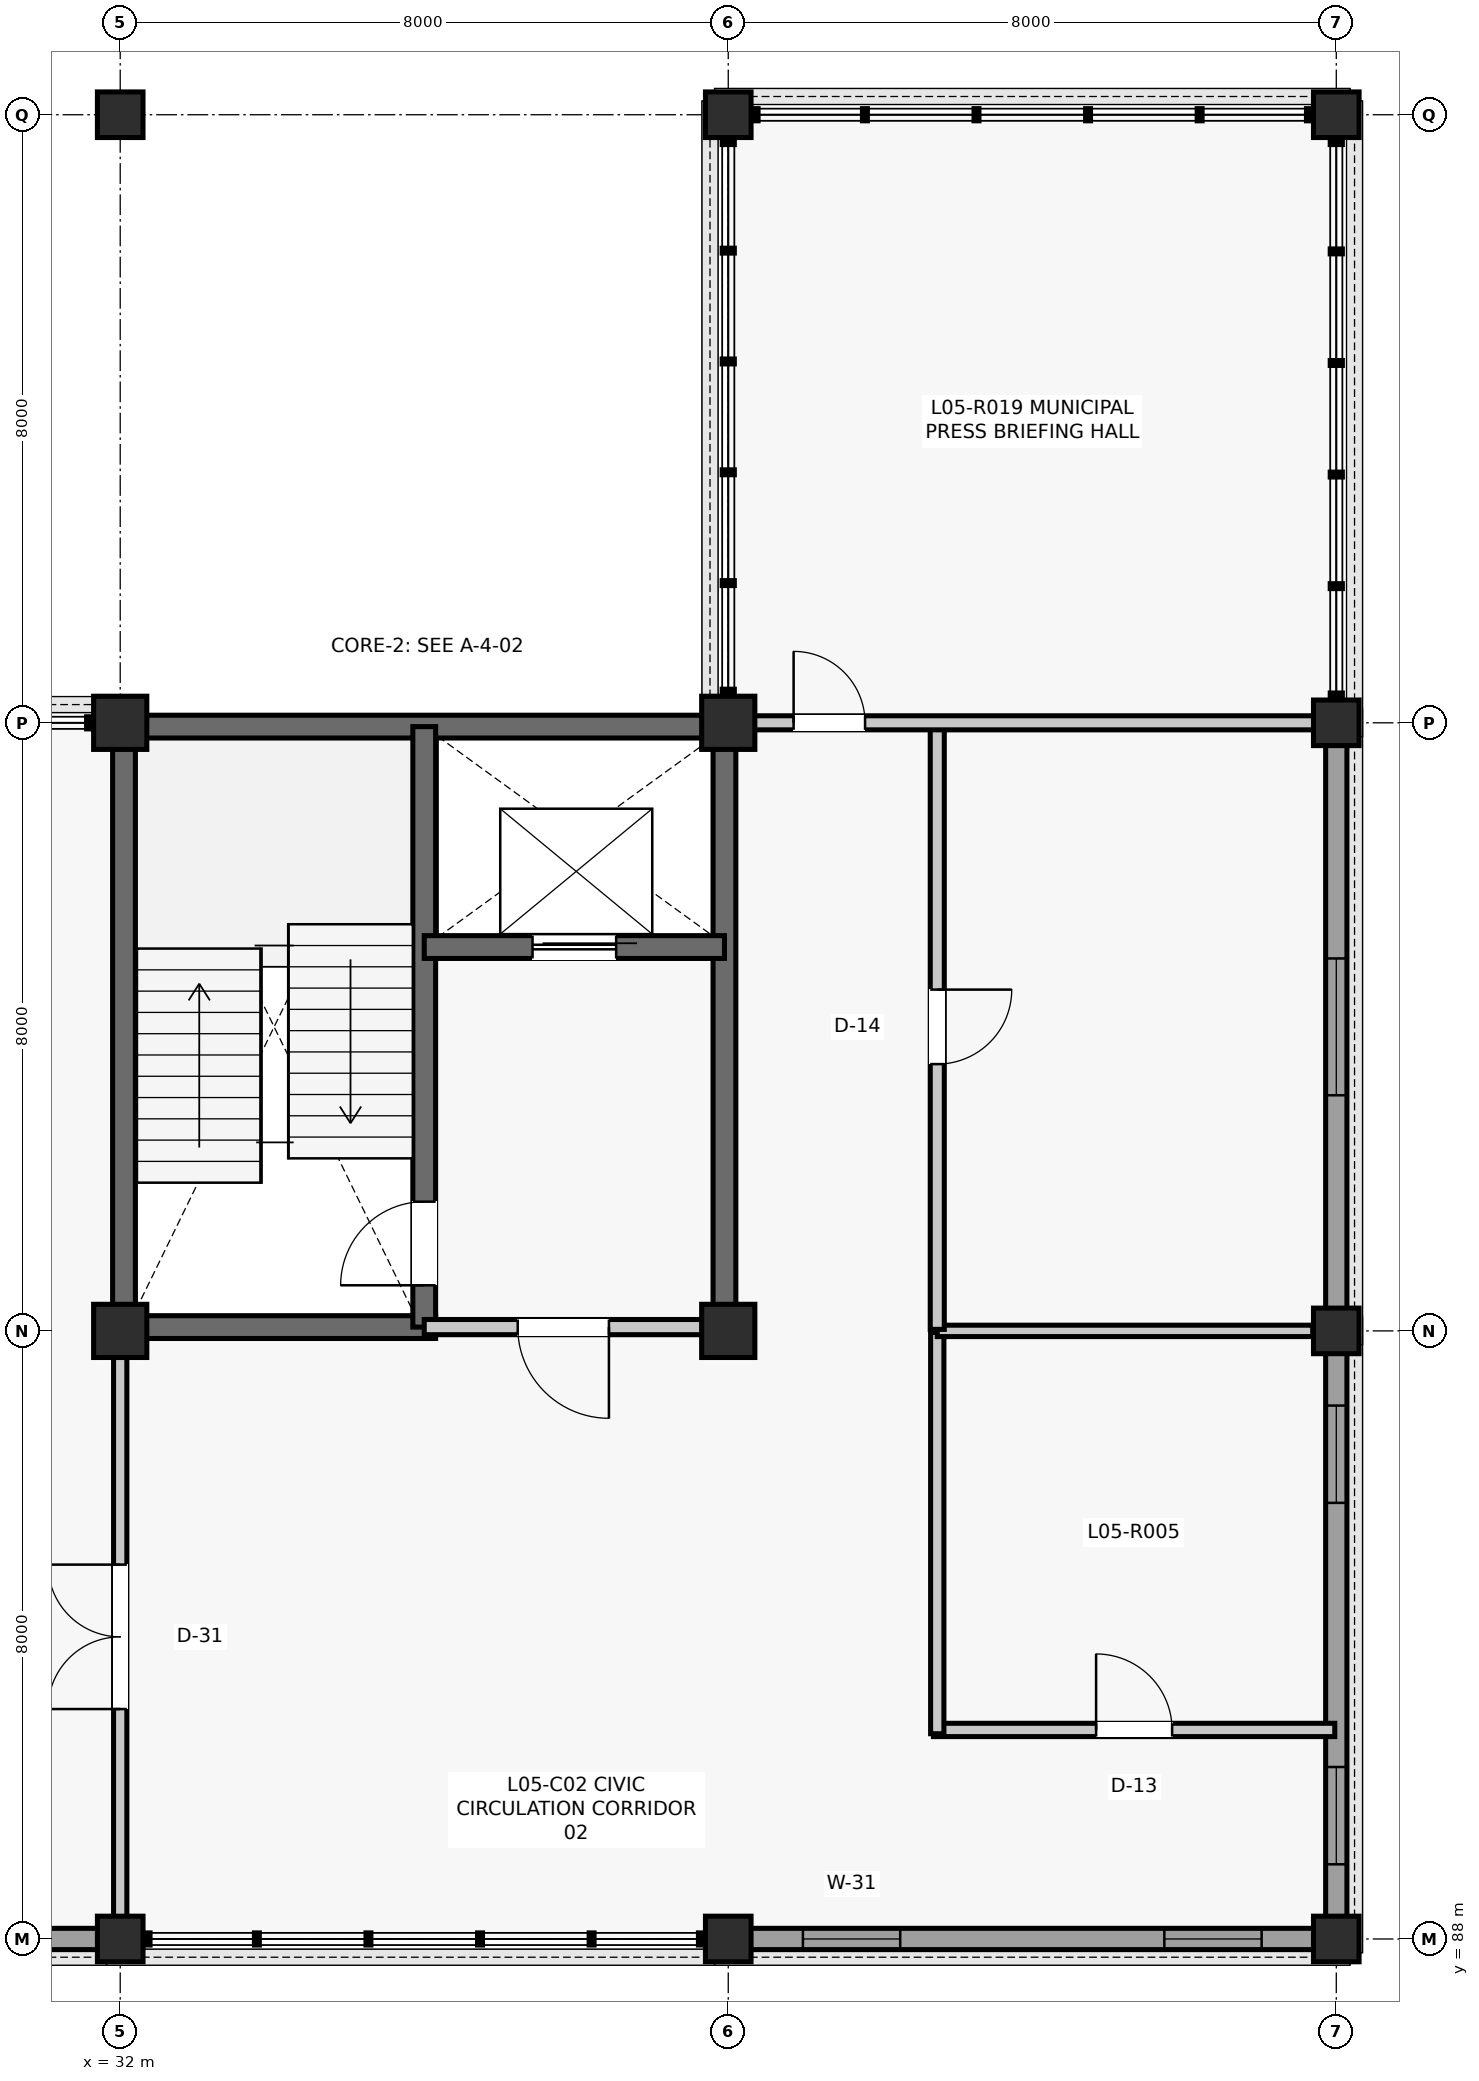
"""IFC4 building model, lengths in metres.
Left out: names, types, materials, properties, quantities, classifications, styles, units other than length and angle.
Written with IfcOpenShell. Run it as: python <this file> out.ifc"""

import sys

from ifc_helpers import new_model, si_unit, direction, frame, frame_2d, origin, origin_2d, place, context, subcontext, project, spatial, rectangle, extrude, element, fill, save


model = new_model("IFC4")
c1 = context("Model", 3, precision=1e-05, world=origin(), true_north=direction((0.0, 1.0)))
c2 = subcontext(c1, "Body", "Model", "MODEL_VIEW")
j1 = project(units=[si_unit("LENGTHUNIT", "METRE"), si_unit("PLANEANGLEUNIT", "RADIAN")], contexts=[c1])
p1 = place(None, origin())
s1 = spatial("IfcSite", under=j1, at=p1, CompositionType="ELEMENT")
p2 = place(p1, origin())
s2 = spatial("IfcBuilding", under=s1, at=p2, CompositionType="ELEMENT")
p3 = place(p2, frame((0.0, 0.0, 21.78)))
s3 = spatial("IfcBuildingStorey", under=s2, at=p3, CompositionType="ELEMENT", Elevation=21.78)
p4 = place(p3, frame((32.0, 88.0, 0.0), z_axis=(0.0, 0.0, 1.0), x_axis=(1.0, 0.0, 0.0)))
e1 = element("IfcColumn", 1, at=p4, inside=s3, PredefinedType="COLUMN", context=c2, shape_type="SweptSolid", body=[
    extrude(rectangle(XDim=0.6, YDim=0.6, at=origin_2d()), origin(), (0.0, 0.0, 1.0), 3.96),
])
for number, where, z_axis, x_axis in (
    (2, (32.0, 96.0, 0.0), (0.0, 0.0, 1.0), (1.0, 0.0, 0.0)),
    (3, (32.0, 104.0, 0.0), (0.0, 0.0, 1.0), (1.0, 0.0, 0.0)),
):
    element("IfcColumn", number, at=place(p3, frame(where, z_axis=z_axis, x_axis=x_axis)), inside=s3, PredefinedType="COLUMN", context=c2, shape_type="SweptSolid", body=[
        extrude(rectangle(XDim=0.7, YDim=0.7, at=origin_2d()), origin(), (0.0, 0.0, 1.0), 3.96),
    ])
for number, where, z_axis, x_axis in (
    (4, (32.0, 112.0, 0.0), (0.0, 0.0, 1.0), (1.0, 0.0, 0.0)),
    (5, (40.0, 88.0, 0.0), (0.0, 0.0, 1.0), (1.0, 0.0, 0.0)),
):
    element("IfcColumn", number, at=place(p3, frame(where, z_axis=z_axis, x_axis=x_axis)), inside=s3, PredefinedType="COLUMN", context=c2, shape_type="SweptSolid", body=[
        extrude(rectangle(XDim=0.6, YDim=0.6, at=origin_2d()), origin(), (0.0, 0.0, 1.0), 3.96),
    ])
for number, where, z_axis, x_axis in (
    (6, (40.0, 96.0, 0.0), (0.0, 0.0, 1.0), (1.0, 0.0, 0.0)),
    (7, (40.0, 104.0, 0.0), (0.0, 0.0, 1.0), (1.0, 0.0, 0.0)),
):
    element("IfcColumn", number, at=place(p3, frame(where, z_axis=z_axis, x_axis=x_axis)), inside=s3, PredefinedType="COLUMN", context=c2, shape_type="SweptSolid", body=[
        extrude(rectangle(XDim=0.7, YDim=0.7, at=origin_2d()), origin(), (0.0, 0.0, 1.0), 3.96),
    ])
for number, where, z_axis, x_axis in (
    (8, (40.0, 112.0, 0.0), (0.0, 0.0, 1.0), (1.0, 0.0, 0.0)),
    (9, (48.0, 88.0, 0.0), (0.0, 0.0, 1.0), (1.0, 0.0, 0.0)),
    (10, (48.0, 96.0, 0.0), (0.0, 0.0, 1.0), (1.0, 0.0, 0.0)),
    (11, (48.0, 104.0, 0.0), (0.0, 0.0, 1.0), (1.0, 0.0, 0.0)),
    (12, (48.0, 112.0, 0.0), (0.0, 0.0, 1.0), (1.0, 0.0, 0.0)),
):
    element("IfcColumn", number, at=place(p3, frame(where, z_axis=z_axis, x_axis=x_axis)), inside=s3, PredefinedType="COLUMN", context=c2, shape_type="SweptSolid", body=[
        extrude(rectangle(XDim=0.6, YDim=0.6, at=origin_2d()), origin(), (0.0, 0.0, 1.0), 3.96),
    ])
p5 = place(p3, frame((24.285, 88.0, 0.0), z_axis=(0.0, 0.0, 1.0), x_axis=(1.0, 0.0, 0.0)))
e13 = element("IfcWall", 13, at=p5, inside=s3, PredefinedType="SOLIDWALL", context=c2, shape_type="SweptSolid", body=[
    extrude(rectangle(XDim=7.43, YDim=0.28, at=frame_2d((3.715, 0.0))), origin(), (0.0, 0.0, 1.0), 3.372),
])
p6 = place(p5, frame((2.99, 0.0, 0.9)))
e14 = element("IfcOpeningElement", 14, at=p6, cuts=e13, PredefinedType="OPENING", context=c2, shape_type="SweptSolid", body=[
    extrude(rectangle(XDim=1.45, YDim=2.15, at=frame_2d((0.725, 1.075))), frame((0.0, 0.15, 0.0), z_axis=(0.0, -1.0, 0.0), x_axis=(1.0, 0.0, 0.0)), (0.0, 0.0, 1.0), 0.3),
])
p7 = place(p3, frame((40.285, 88.0, 0.0), z_axis=(0.0, 0.0, 1.0), x_axis=(1.0, 0.0, 0.0)))
e15 = element("IfcWall", 15, at=p7, inside=s3, PredefinedType="SOLIDWALL", context=c2, shape_type="SweptSolid", body=[
    extrude(rectangle(XDim=7.43, YDim=0.28, at=frame_2d((3.715, 0.0))), origin(), (0.0, 0.0, 1.0), 3.369),
])
p8 = place(p7, frame((0.698, 0.0, 0.95)))
e16 = element("IfcOpeningElement", 16, at=p8, cuts=e15, PredefinedType="OPENING", context=c2, shape_type="SweptSolid", body=[
    extrude(rectangle(XDim=1.28, YDim=1.72, at=frame_2d((0.64, 0.86))), frame((0.0, 0.15, 0.0), z_axis=(0.0, -1.0, 0.0), x_axis=(1.0, 0.0, 0.0)), (0.0, 0.0, 1.0), 0.3),
])
p9 = place(p7, frame((5.453, 0.0, 0.95)))
e17 = element("IfcOpeningElement", 17, at=p9, cuts=e15, PredefinedType="OPENING", context=c2, shape_type="SweptSolid", body=[
    extrude(rectangle(XDim=1.28, YDim=1.72, at=frame_2d((0.64, 0.86))), frame((0.0, 0.15, 0.0), z_axis=(0.0, -1.0, 0.0), x_axis=(1.0, 0.0, 0.0)), (0.0, 0.0, 1.0), 0.3),
])
p10 = place(p3, frame((48.0, 88.285, 0.0), z_axis=(0.0, 0.0, 1.0), x_axis=(0.0, 1.0, 0.0)))
e18 = element("IfcWall", 18, at=p10, inside=s3, PredefinedType="SOLIDWALL", context=c2, shape_type="SweptSolid", body=[
    extrude(rectangle(XDim=7.43, YDim=0.28, at=frame_2d((3.715, 0.0))), origin(), (0.0, 0.0, 1.0), 3.309),
])
p11 = place(p10, frame((0.698, 0.0, 0.95)))
e19 = element("IfcOpeningElement", 19, at=p11, cuts=e18, PredefinedType="OPENING", context=c2, shape_type="SweptSolid", body=[
    extrude(rectangle(XDim=1.28, YDim=1.72, at=frame_2d((0.64, 0.86))), frame((0.0, 0.15, 0.0), z_axis=(0.0, -1.0, 0.0), x_axis=(1.0, 0.0, 0.0)), (0.0, 0.0, 1.0), 0.3),
])
p12 = place(p10, frame((5.453, 0.0, 0.95)))
e20 = element("IfcOpeningElement", 20, at=p12, cuts=e18, PredefinedType="OPENING", context=c2, shape_type="SweptSolid", body=[
    extrude(rectangle(XDim=1.28, YDim=1.72, at=frame_2d((0.64, 0.86))), frame((0.0, 0.15, 0.0), z_axis=(0.0, -1.0, 0.0), x_axis=(1.0, 0.0, 0.0)), (0.0, 0.0, 1.0), 0.3),
])
p13 = place(p3, frame((48.0, 96.285, 0.0), z_axis=(0.0, 0.0, 1.0), x_axis=(0.0, 1.0, 0.0)))
e21 = element("IfcWall", 21, at=p13, inside=s3, PredefinedType="SOLIDWALL", context=c2, shape_type="SweptSolid", body=[
    extrude(rectangle(XDim=7.43, YDim=0.28, at=frame_2d((3.715, 0.0))), origin(), (0.0, 0.0, 1.0), 3.372),
])
p14 = place(p13, frame((2.815, 0.0, 0.9)))
e22 = element("IfcOpeningElement", 22, at=p14, cuts=e21, PredefinedType="OPENING", context=c2, shape_type="SweptSolid", body=[
    extrude(rectangle(XDim=1.8, YDim=2.0, at=frame_2d((0.9, 1.0))), frame((0.0, 0.15, 0.0), z_axis=(0.0, -1.0, 0.0), x_axis=(1.0, 0.0, 0.0)), (0.0, 0.0, 1.0), 0.3),
])
for number, where, z_axis, x_axis in (
    (23, (32.05, 96.24, 0.0), (0.0, 0.0, 1.0), (0.0, 1.0, 0.0)),
    (24, (32.24, 103.95, 0.0), (0.0, 0.0, 1.0), (1.0, 0.0, 0.0)),
    (25, (39.95, 96.24, 0.0), (0.0, 0.0, 1.0), (0.0, 1.0, 0.0)),
):
    element("IfcWall", number, at=place(p3, frame(where, z_axis=z_axis, x_axis=x_axis)), inside=s3, PredefinedType="SHEAR", context=c2, shape_type="SweptSolid", body=[
        extrude(rectangle(XDim=7.52, YDim=0.3, at=frame_2d((3.76, 0.0))), origin(), (0.0, 0.0, 1.0), 3.735),
    ])
p15 = place(p3, frame((32.24, 96.05, 0.0), z_axis=(0.0, 0.0, 1.0), x_axis=(1.0, 0.0, 0.0)))
e26 = element("IfcWall", 26, at=p15, inside=s3, PredefinedType="SHEAR", context=c2, shape_type="SweptSolid", body=[
    extrude(rectangle(XDim=3.91, YDim=0.3, at=frame_2d((1.955, 0.0))), origin(), (0.0, 0.0, 1.0), 3.735),
])
p16 = place(p3, frame((36.0, 96.05, 0.0), z_axis=(0.0, 0.0, 1.0), x_axis=(0.0, 1.0, 0.0)))
e27 = element("IfcWall", 27, at=p16, inside=s3, PredefinedType="SHEAR", context=c2, shape_type="SweptSolid", body=[
    extrude(rectangle(XDim=7.9, YDim=0.3, at=frame_2d((3.95, 0.0))), origin(), (0.0, 0.0, 1.0), 3.735),
])
p17 = place(p16, frame((0.55, 0.0, 0.0)))
e28 = element("IfcOpeningElement", 28, at=p17, cuts=e27, PredefinedType="OPENING", context=c2, shape_type="SweptSolid", body=[
    extrude(rectangle(XDim=1.1, YDim=2.15, at=frame_2d((0.55, 1.075))), frame((0.0, 0.16, 0.0), z_axis=(0.0, -1.0, 0.0), x_axis=(1.0, 0.0, 0.0)), (0.0, 0.0, 1.0), 0.32),
])
p18 = place(p3, frame((36.0, 101.05, 0.0), z_axis=(0.0, 0.0, 1.0), x_axis=(1.0, 0.0, 0.0)))
e29 = element("IfcWall", 29, at=p18, inside=s3, PredefinedType="SHEAR", context=c2, shape_type="SweptSolid", body=[
    extrude(rectangle(XDim=3.95, YDim=0.3, at=frame_2d((1.975, 0.0))), origin(), (0.0, 0.0, 1.0), 3.735),
])
p19 = place(p18, frame((1.425, 0.0, 0.0)))
e30 = element("IfcOpeningElement", 30, at=p19, cuts=e29, PredefinedType="OPENING", context=c2, shape_type="SweptSolid", body=[
    extrude(rectangle(XDim=1.1, YDim=2.2, at=frame_2d((0.55, 1.1))), frame((0.0, 0.16, 0.0), z_axis=(0.0, -1.0, 0.0), x_axis=(1.0, 0.0, 0.0)), (0.0, 0.0, 1.0), 0.32),
])
p20 = place(p3, frame((36.0, 96.05, 0.0), z_axis=(0.0, 0.0, 1.0), x_axis=(1.0, 0.0, 0.0)))
e31 = element("IfcWall", 31, at=p20, inside=s3, PredefinedType="PARTITIONING", context=c2, shape_type="SweptSolid", body=[
    extrude(rectangle(XDim=3.66, YDim=0.2, at=frame_2d((1.83, 0.0))), origin(), (0.0, 0.0, 1.0), 3.257),
])
p21 = place(p20, frame((1.23, 0.0, 0.0)))
e32 = element("IfcOpeningElement", 32, at=p21, cuts=e31, PredefinedType="OPENING", context=c2, shape_type="SweptSolid", body=[
    extrude(rectangle(XDim=1.2, YDim=2.15, at=frame_2d((0.6, 1.075))), frame((0.0, 0.11, 0.0), z_axis=(0.0, -1.0, 0.0), x_axis=(1.0, 0.0, 0.0)), (0.0, 0.0, 1.0), 0.22),
])
p22 = place(p3, frame((42.7, 90.75, 0.0), z_axis=(0.0, 0.0, 1.0), x_axis=(1.0, 0.0, 0.0)))
e33 = element("IfcWall", 33, at=p22, inside=s3, PredefinedType="PARTITIONING", context=c2, shape_type="SweptSolid", body=[
    extrude(rectangle(XDim=5.28, YDim=0.175, at=frame_2d((2.64, 0.0))), origin(), (0.0, 0.0, 1.0), 3.302),
])
p23 = place(p22, frame((2.14, 0.0, 0.0)))
e34 = element("IfcOpeningElement", 34, at=p23, cuts=e33, PredefinedType="OPENING", context=c2, shape_type="SweptSolid", body=[
    extrude(rectangle(XDim=1.0, YDim=2.15, at=frame_2d((0.5, 1.075))), frame((0.0, 0.097, 0.0), z_axis=(0.0, -1.0, 0.0), x_axis=(1.0, 0.0, 0.0)), (0.0, 0.0, 1.0), 0.195),
])
p24 = place(p3, frame((42.75, 90.7, 0.0), z_axis=(0.0, 0.0, 1.0), x_axis=(0.0, 1.0, 0.0)))
e35 = element("IfcWall", 35, at=p24, inside=s3, PredefinedType="PARTITIONING", context=c2, shape_type="SweptSolid", body=[
    extrude(rectangle(XDim=5.28, YDim=0.175, at=frame_2d((2.64, 0.0))), origin(), (0.0, 0.0, 1.0), 3.258),
])
p25 = place(p3, frame((42.75, 96.0, 0.0), z_axis=(0.0, 0.0, 1.0), x_axis=(1.0, 0.0, 0.0)))
e36 = element("IfcWall", 36, at=p25, inside=s3, PredefinedType="PARTITIONING", context=c2, shape_type="SweptSolid", body=[
    extrude(rectangle(XDim=4.94, YDim=0.15, at=frame_2d((2.47, 0.0))), origin(), (0.0, 0.0, 1.0), 3.258),
])
p26 = place(p3, frame((42.75, 96.02, 0.0), z_axis=(0.0, 0.0, 1.0), x_axis=(0.0, 1.0, 0.0)))
e37 = element("IfcWall", 37, at=p26, inside=s3, PredefinedType="PARTITIONING", context=c2, shape_type="SweptSolid", body=[
    extrude(rectangle(XDim=7.96, YDim=0.185, at=frame_2d((3.98, 0.0))), origin(), (0.0, 0.0, 1.0), 3.246),
])
p27 = place(p26, frame((3.49, 0.0, 0.0)))
e38 = element("IfcOpeningElement", 38, at=p27, cuts=e37, PredefinedType="OPENING", context=c2, shape_type="SweptSolid", body=[
    extrude(rectangle(XDim=0.98, YDim=2.15, at=frame_2d((0.49, 1.075))), frame((0.0, 0.103, 0.0), z_axis=(0.0, -1.0, 0.0), x_axis=(1.0, 0.0, 0.0)), (0.0, 0.0, 1.0), 0.205),
])
p28 = place(p3, frame((32.0, 88.29, 0.0), z_axis=(0.0, 0.0, 1.0), x_axis=(0.0, 1.0, 0.0)))
e39 = element("IfcWall", 39, at=p28, inside=s3, PredefinedType="PARTITIONING", context=c2, shape_type="SweptSolid", body=[
    extrude(rectangle(XDim=7.37, YDim=0.175, at=frame_2d((3.685, 0.0))), origin(), (0.0, 0.0, 1.0), 3.252),
])
p29 = place(p28, frame((2.735, 0.0, 0.0)))
e40 = element("IfcOpeningElement", 40, at=p29, cuts=e39, PredefinedType="OPENING", context=c2, shape_type="SweptSolid", body=[
    extrude(rectangle(XDim=1.9, YDim=2.38, at=frame_2d((0.95, 1.19))), frame((0.0, 0.097, 0.0), z_axis=(0.0, -1.0, 0.0), x_axis=(1.0, 0.0, 0.0)), (0.0, 0.0, 1.0), 0.195),
])
p30 = place(p3, frame((40.34, 104.0, 0.0), z_axis=(0.0, 0.0, 1.0), x_axis=(1.0, 0.0, 0.0)))
e41 = element("IfcWall", 41, at=p30, inside=s3, PredefinedType="PARTITIONING", context=c2, shape_type="SweptSolid", body=[
    extrude(rectangle(XDim=7.37, YDim=0.185, at=frame_2d((3.685, 0.0))), origin(), (0.0, 0.0, 1.0), 3.246),
])
p31 = place(p30, frame((0.52, 0.0, 0.0)))
e42 = element("IfcOpeningElement", 42, at=p31, cuts=e41, PredefinedType="OPENING", context=c2, shape_type="SweptSolid", body=[
    extrude(rectangle(XDim=0.94, YDim=2.12, at=frame_2d((0.47, 1.06))), frame((0.0, 0.103, 0.0), z_axis=(0.0, -1.0, 0.0), x_axis=(1.0, 0.0, 0.0)), (0.0, 0.0, 1.0), 0.205),
])
p32 = place(p8, origin())
e43 = element("IfcWindow", 43, at=p32, inside=s3, PartitioningType="SINGLE_PANEL", PredefinedType="WINDOW", context=c2, shape_type="SweptSolid", body=[
    extrude(rectangle(XDim=1.28, YDim=1.72, at=frame_2d((0.64, 0.86))), frame((0.0, 0.03, 0.0), z_axis=(0.0, -1.0, 0.0), x_axis=(1.0, 0.0, 0.0)), (0.0, 0.0, 1.0), 0.06),
])
fill(e16, e43)
p33 = place(p9, origin())
e44 = element("IfcWindow", 44, at=p33, inside=s3, PartitioningType="SINGLE_PANEL", PredefinedType="WINDOW", context=c2, shape_type="SweptSolid", body=[
    extrude(rectangle(XDim=1.28, YDim=1.72, at=frame_2d((0.64, 0.86))), frame((0.0, 0.03, 0.0), z_axis=(0.0, -1.0, 0.0), x_axis=(1.0, 0.0, 0.0)), (0.0, 0.0, 1.0), 0.06),
])
fill(e17, e44)
p34 = place(p11, origin())
e45 = element("IfcWindow", 45, at=p34, inside=s3, PartitioningType="SINGLE_PANEL", PredefinedType="WINDOW", context=c2, shape_type="SweptSolid", body=[
    extrude(rectangle(XDim=1.28, YDim=1.72, at=frame_2d((0.64, 0.86))), frame((0.0, 0.03, 0.0), z_axis=(0.0, -1.0, 0.0), x_axis=(1.0, 0.0, 0.0)), (0.0, 0.0, 1.0), 0.06),
])
fill(e19, e45)
p35 = place(p12, origin())
e46 = element("IfcWindow", 46, at=p35, inside=s3, PartitioningType="SINGLE_PANEL", PredefinedType="WINDOW", context=c2, shape_type="SweptSolid", body=[
    extrude(rectangle(XDim=1.28, YDim=1.72, at=frame_2d((0.64, 0.86))), frame((0.0, 0.03, 0.0), z_axis=(0.0, -1.0, 0.0), x_axis=(1.0, 0.0, 0.0)), (0.0, 0.0, 1.0), 0.06),
])
fill(e20, e46)
p36 = place(p14, origin())
e47 = element("IfcWindow", 47, at=p36, inside=s3, PartitioningType="SINGLE_PANEL", PredefinedType="WINDOW", context=c2, shape_type="SweptSolid", body=[
    extrude(rectangle(XDim=1.8, YDim=2.0, at=frame_2d((0.9, 1.0))), frame((0.0, 0.03, 0.0), z_axis=(0.0, -1.0, 0.0), x_axis=(1.0, 0.0, 0.0)), (0.0, 0.0, 1.0), 0.06),
])
fill(e22, e47)
p37 = place(p17, origin())
e48 = element("IfcDoor", 48, at=p37, inside=s3, OperationType="SINGLE_SWING_LEFT", PredefinedType="DOOR", context=c2, shape_type="SweptSolid", body=[
    extrude(rectangle(XDim=1.1, YDim=2.15, at=frame_2d((0.55, 1.075))), frame((0.0, 0.025, 0.0), z_axis=(0.0, -1.0, 0.0), x_axis=(1.0, 0.0, 0.0)), (0.0, 0.0, 1.0), 0.05),
])
fill(e28, e48)
p38 = place(p19, origin())
e49 = element("IfcDoor", 49, at=p38, inside=s3, OperationType="SLIDING_TO_LEFT", PredefinedType="DOOR", context=c2, shape_type="SweptSolid", body=[
    extrude(rectangle(XDim=1.1, YDim=2.2, at=frame_2d((0.55, 1.1))), frame((0.0, 0.025, 0.0), z_axis=(0.0, -1.0, 0.0), x_axis=(1.0, 0.0, 0.0)), (0.0, 0.0, 1.0), 0.05),
])
fill(e30, e49)
p39 = place(p21, frame((1.2, 0.0, 0.0), z_axis=(0.0, 0.0, 1.0), x_axis=(-1.0, 0.0, 0.0)))
e50 = element("IfcDoor", 50, at=p39, inside=s3, OperationType="SINGLE_SWING_RIGHT", PredefinedType="DOOR", context=c2, shape_type="SweptSolid", body=[
    extrude(rectangle(XDim=1.2, YDim=2.15, at=frame_2d((0.6, 1.075))), frame((0.0, 0.025, 0.0), z_axis=(0.0, -1.0, 0.0), x_axis=(1.0, 0.0, 0.0)), (0.0, 0.0, 1.0), 0.05),
])
fill(e32, e50)
p40 = place(p23, origin())
e51 = element("IfcDoor", 51, at=p40, inside=s3, OperationType="SINGLE_SWING_LEFT", PredefinedType="DOOR", context=c2, shape_type="SweptSolid", body=[
    extrude(rectangle(XDim=1.0, YDim=2.15, at=frame_2d((0.5, 1.075))), frame((0.0, 0.025, 0.0), z_axis=(0.0, -1.0, 0.0), x_axis=(1.0, 0.0, 0.0)), (0.0, 0.0, 1.0), 0.05),
])
fill(e34, e51)
p41 = place(p27, frame((0.98, 0.0, 0.0), z_axis=(0.0, 0.0, 1.0), x_axis=(-1.0, 0.0, 0.0)))
e52 = element("IfcDoor", 52, at=p41, inside=s3, OperationType="SINGLE_SWING_RIGHT", PredefinedType="DOOR", context=c2, shape_type="SweptSolid", body=[
    extrude(rectangle(XDim=0.98, YDim=2.15, at=frame_2d((0.49, 1.075))), frame((0.0, 0.025, 0.0), z_axis=(0.0, -1.0, 0.0), x_axis=(1.0, 0.0, 0.0)), (0.0, 0.0, 1.0), 0.05),
])
fill(e38, e52)
p42 = place(p29, origin())
e53 = element("IfcDoor", 53, at=p42, inside=s3, OperationType="DOUBLE_DOOR_SINGLE_SWING", PredefinedType="DOOR", context=c2, shape_type="SweptSolid", body=[
    extrude(rectangle(XDim=1.9, YDim=2.38, at=frame_2d((0.95, 1.19))), frame((0.0, 0.025, 0.0), z_axis=(0.0, -1.0, 0.0), x_axis=(1.0, 0.0, 0.0)), (0.0, 0.0, 1.0), 0.05),
])
fill(e40, e53)
p43 = place(p31, origin())
e54 = element("IfcDoor", 54, at=p43, inside=s3, OperationType="SINGLE_SWING_LEFT", PredefinedType="DOOR", context=c2, shape_type="SweptSolid", body=[
    extrude(rectangle(XDim=0.94, YDim=2.12, at=frame_2d((0.47, 1.06))), frame((0.0, 0.025, 0.0), z_axis=(0.0, -1.0, 0.0), x_axis=(1.0, 0.0, 0.0)), (0.0, 0.0, 1.0), 0.05),
])
fill(e42, e54)
save(model, sys.argv[1])
